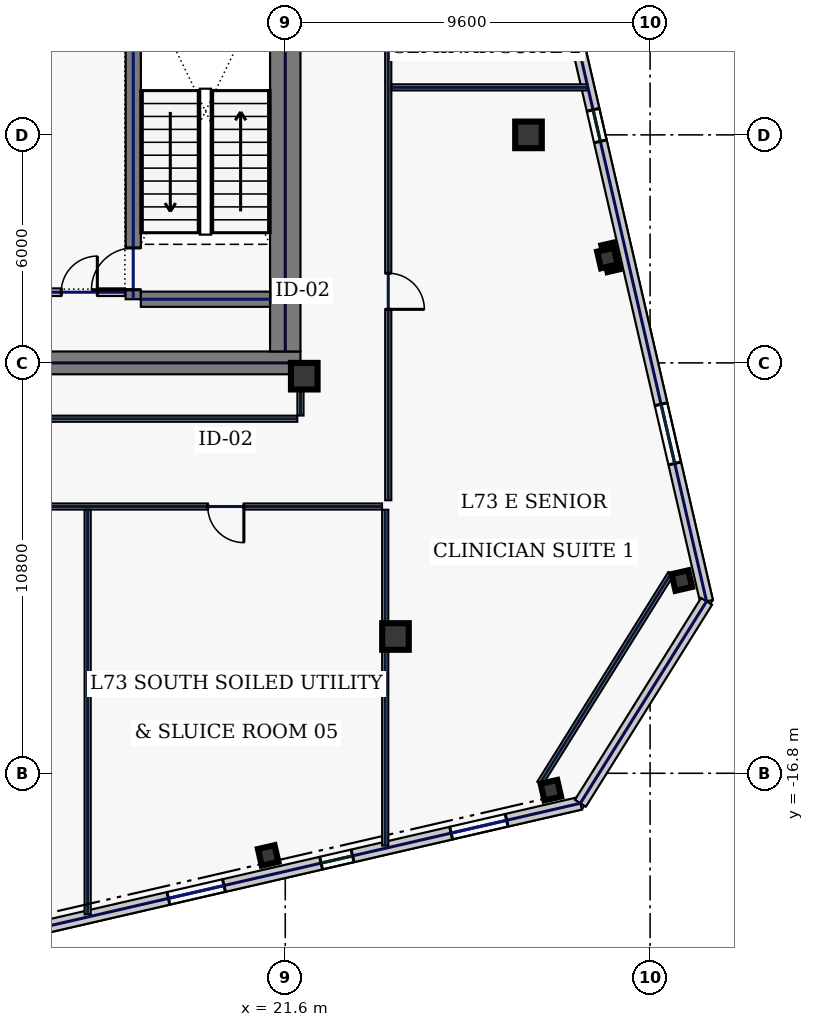
"""IFC4 building model, lengths in metres.
Left out: names, types, materials, properties, quantities, classifications, styles, units other than length and angle.
Written with IfcOpenShell. Run it as: python <this file> out.ifc"""

import sys

from ifc_helpers import new_model, si_unit, direction, frame, frame_2d, origin, origin_2d, place, context, subcontext, project, spatial, rectangle, hollow_rectangle, extrude, element, fill, save


model = new_model("IFC4")
c1 = context("Model", 3, precision=1e-05, world=origin(), true_north=direction((0.0, 1.0)))
c2 = subcontext(c1, "Body", "Model", "MODEL_VIEW")
j1 = project(units=[si_unit("LENGTHUNIT", "METRE"), si_unit("PLANEANGLEUNIT", "RADIAN")], contexts=[c1])
p1 = place(None, origin())
s1 = spatial("IfcSite", under=j1, at=p1, CompositionType="ELEMENT")
p2 = place(p1, origin())
s2 = spatial("IfcBuilding", under=s1, at=p2, CompositionType="ELEMENT")
p3 = place(p2, frame((0.0, 0.0, 313.0)))
s3 = spatial("IfcBuildingStorey", under=s2, at=p3, CompositionType="ELEMENT", Elevation=313.0)
p4 = place(p3, frame((10.5, -6.0, 0.0), z_axis=(0.0, 0.0, 1.0), x_axis=(1.0, 0.0, 0.0)))
e1 = element("IfcWall", 1, at=p4, inside=s3, PredefinedType="SHEAR", context=c2, shape_type="SweptSolid", body=[
    extrude(rectangle(XDim=11.5, YDim=0.6, at=frame_2d((5.75, 0.0))), origin(), (0.0, 0.0, 1.0), 3.74),
])
p5 = place(p3, frame((21.6, -5.7, 0.0), z_axis=(0.0, 0.0, 1.0), x_axis=(0.0, 1.0, 0.0)))
e2 = element("IfcWall", 2, at=p5, inside=s3, PredefinedType="SHEAR", context=c2, shape_type="SweptSolid", body=[
    extrude(rectangle(XDim=11.4, YDim=0.8, at=frame_2d((5.7, 0.0))), origin(), (0.0, 0.0, 1.0), 3.74),
])
p6 = place(p3, frame((17.6, -4.325, 0.0), z_axis=(0.0, 0.0, 1.0), x_axis=(0.0, 1.0, 0.0)))
e3 = element("IfcWall", 3, at=p6, inside=s3, PredefinedType="SHEAR", context=c2, shape_type="SweptSolid", body=[
    extrude(rectangle(XDim=8.65, YDim=0.4, at=frame_2d((4.325, 0.0))), origin(), (0.0, 0.0, 1.0), 3.74),
])
p7 = place(p6, frame((0.25, 0.0, 0.0)))
e4 = element("IfcOpeningElement", 4, at=p7, cuts=e3, PredefinedType="OPENING", context=c2, shape_type="SweptSolid", body=[
    extrude(rectangle(XDim=1.1, YDim=2.2, at=frame_2d((0.55, 1.1))), frame((0.0, 0.21, 0.0), z_axis=(0.0, -1.0, 0.0), x_axis=(1.0, 0.0, 0.0)), (0.0, 0.0, 1.0), 0.42),
])
p8 = place(p3, frame((17.8, -4.325, 0.0), z_axis=(0.0, 0.0, 1.0), x_axis=(1.0, 0.0, 0.0)))
e5 = element("IfcWall", 5, at=p8, inside=s3, PredefinedType="SHEAR", context=c2, shape_type="SweptSolid", body=[
    extrude(rectangle(XDim=3.4, YDim=0.4, at=frame_2d((1.7, 0.0))), origin(), (0.0, 0.0, 1.0), 3.74),
])
for number, where, z_axis, x_axis in (
    (6, (22.1, -6.35, 0.0), (0.0, 0.0, 1.0), (1.0, 0.0, 0.0)),
    (7, (24.5, -13.2, 0.0), (0.0, 0.0, 1.0), (1.0, 0.0, 0.0)),
    (8, (28.0, 0.0, 0.0), (0.0, 0.0, 1.0), (1.0, 0.0, 0.0)),
):
    element("IfcColumn", number, at=place(p3, frame(where, z_axis=z_axis, x_axis=x_axis)), inside=s3, PredefinedType="COLUMN", context=c2, shape_type="SweptSolid", body=[
        extrude(hollow_rectangle(XDim=0.7, YDim=0.7, WallThickness=0.032, at=origin_2d()), origin(), (0.0, 0.0, 1.0), 3.74),
    ])
for number, where, z_axis, x_axis in (
    (9, (21.15, -18.962, 0.0), (0.0, 0.0, 1.0), (0.974, 0.225, 0.0)),
    (10, (28.589, -17.245, 0.0), (0.0, 0.0, 1.0), (0.974, 0.225, 0.0)),
    (11, (32.036, -11.728, 0.0), (0.0, 0.0, 1.0), (0.974, 0.225, 0.0)),
    (12, (30.077, -3.241, 0.0), (0.0, 0.0, 1.0), (0.974, 0.225, 0.0)),
):
    element("IfcColumn", number, at=place(p3, frame(where, z_axis=z_axis, x_axis=x_axis)), inside=s3, PredefinedType="COLUMN", context=c2, shape_type="SweptSolid", body=[
        extrude(hollow_rectangle(XDim=0.45, YDim=0.45, WallThickness=0.022, at=origin_2d()), origin(), (0.0, 0.0, 1.0), 3.74),
    ])
p9 = place(p3, frame((12.445, -21.495, 0.0), z_axis=(0.0, 0.0, 1.0), x_axis=(0.974369392164, 0.224953967767, 0.0)))
e13 = element("IfcWall", 13, at=p9, inside=s3, PredefinedType="STANDARD", context=c2, shape_type="SweptSolid", body=[
    extrude(rectangle(XDim=17.366, YDim=0.34, at=frame_2d((8.683, 0.0))), origin(), (0.0, 0.0, 1.0), 3.74),
])
p10 = place(p9, frame((6.24, 0.0, 0.9)))
e14 = element("IfcOpeningElement", 14, at=p10, cuts=e13, PredefinedType="OPENING", context=c2, shape_type="SweptSolid", body=[
    extrude(rectangle(XDim=1.5, YDim=2.0, at=frame_2d((0.75, 1.0))), frame((0.0, 0.18, 0.0), z_axis=(0.0, -1.0, 0.0), x_axis=(1.0, 0.0, 0.0)), (0.0, 0.0, 1.0), 0.36),
])
p11 = place(p9, frame((10.363, 0.0, 0.9)))
e15 = element("IfcOpeningElement", 15, at=p11, cuts=e13, PredefinedType="OPENING", context=c2, shape_type="SweptSolid", body=[
    extrude(rectangle(XDim=0.85, YDim=1.85, at=frame_2d((0.425, 0.925))), frame((0.0, 0.18, 0.0), z_axis=(0.0, -1.0, 0.0), x_axis=(1.0, 0.0, 0.0)), (0.0, 0.0, 1.0), 0.36),
])
p12 = place(p9, frame((13.875, 0.0, 0.9)))
e16 = element("IfcOpeningElement", 16, at=p12, cuts=e13, PredefinedType="OPENING", context=c2, shape_type="SweptSolid", body=[
    extrude(rectangle(XDim=1.5, YDim=2.0, at=frame_2d((0.75, 1.0))), frame((0.0, 0.18, 0.0), z_axis=(0.0, -1.0, 0.0), x_axis=(1.0, 0.0, 0.0)), (0.0, 0.0, 1.0), 0.36),
])
p13 = place(p3, frame((32.686, -12.276, 0.0), z_axis=(0.0, 0.0, 1.0), x_axis=(-0.224953091034, 0.974369594576, 0.0)))
e17 = element("IfcWall", 17, at=p13, inside=s3, PredefinedType="STANDARD", context=c2, shape_type="SweptSolid", body=[
    extrude(rectangle(XDim=36.2, YDim=0.34, at=frame_2d((18.1, 0.0))), origin(), (0.0, 0.0, 1.0), 3.74),
])
p14 = place(p13, frame((3.725, 0.0, 0.58)))
e18 = element("IfcOpeningElement", 18, at=p14, cuts=e17, PredefinedType="OPENING", context=c2, shape_type="SweptSolid", body=[
    extrude(rectangle(XDim=1.6, YDim=2.3, at=frame_2d((0.8, 1.15))), frame((0.0, 0.18, 0.0), z_axis=(0.0, -1.0, 0.0), x_axis=(1.0, 0.0, 0.0)), (0.0, 0.0, 1.0), 0.36),
])
p15 = place(p13, frame((12.425, 0.0, 0.75)))
e19 = element("IfcOpeningElement", 19, at=p15, cuts=e17, PredefinedType="OPENING", context=c2, shape_type="SweptSolid", body=[
    extrude(rectangle(XDim=0.85, YDim=1.85, at=frame_2d((0.425, 0.925))), frame((0.0, 0.18, 0.0), z_axis=(0.0, -1.0, 0.0), x_axis=(1.0, 0.0, 0.0)), (0.0, 0.0, 1.0), 0.36),
])
p16 = place(p13, frame((21.825, 0.0, 0.58)))
e20 = element("IfcOpeningElement", 20, at=p16, cuts=e17, PredefinedType="OPENING", context=c2, shape_type="SweptSolid", body=[
    extrude(rectangle(XDim=1.6, YDim=2.3, at=frame_2d((0.8, 1.15))), frame((0.0, 0.18, 0.0), z_axis=(0.0, -1.0, 0.0), x_axis=(1.0, 0.0, 0.0)), (0.0, 0.0, 1.0), 0.36),
])
p17 = place(p13, frame((30.875, 0.0, 0.58)))
e21 = element("IfcOpeningElement", 21, at=p17, cuts=e17, PredefinedType="OPENING", context=c2, shape_type="SweptSolid", body=[
    extrude(rectangle(XDim=1.6, YDim=2.3, at=frame_2d((0.8, 1.15))), frame((0.0, 0.18, 0.0), z_axis=(0.0, -1.0, 0.0), x_axis=(1.0, 0.0, 0.0)), (0.0, 0.0, 1.0), 0.36),
])
p18 = place(p3, frame((29.366, -17.589, 0.0), z_axis=(0.0, 0.0, 1.0), x_axis=(0.529907862057, 0.848055220921, 0.0)))
e22 = element("IfcWall", 22, at=p18, inside=s3, PredefinedType="STANDARD", context=c2, shape_type="SweptSolid", body=[
    extrude(rectangle(XDim=6.265, YDim=0.34, at=frame_2d((3.132, 0.0))), origin(), (0.0, 0.0, 1.0), 3.74),
])
p19 = place(p3, frame((14.825, -4.14, 0.0), z_axis=(0.0, 0.0, 1.0), x_axis=(1.0, 0.0, 0.0)))
e23 = element("IfcWall", 23, at=p19, inside=s3, PredefinedType="SOLIDWALL", context=c2, shape_type="SweptSolid", body=[
    extrude(rectangle(XDim=2.555, YDim=0.2, at=frame_2d((1.277, 0.0))), origin(), (0.0, 0.0, 1.0), 3.74),
])
p20 = place(p19, frame((0.88, 0.0, 0.0)))
e24 = element("IfcOpeningElement", 24, at=p20, cuts=e23, PredefinedType="OPENING", context=c2, shape_type="SweptSolid", body=[
    extrude(rectangle(XDim=0.95, YDim=2.2, at=frame_2d((0.475, 1.1))), frame((0.0, 0.11, 0.0), z_axis=(0.0, -1.0, 0.0), x_axis=(1.0, 0.0, 0.0)), (0.0, 0.0, 1.0), 0.22),
])
p21 = place(p3, frame((28.3, -17.065, 0.0), z_axis=(0.0, 0.0, 1.0), x_axis=(0.529914601736, 0.848051009591, 0.0)))
e25 = element("IfcWall", 25, at=p21, inside=s3, PredefinedType="PARTITIONING", context=c2, shape_type="SweptSolid", body=[
    extrude(rectangle(XDim=6.505, YDim=0.16, at=frame_2d((3.253, 0.0))), origin(), (0.0, 0.0, 1.0), 3.74),
])
p22 = place(p3, frame((24.31, 9.665, 0.0), z_axis=(0.0, 0.0, 1.0), x_axis=(0.0, -1.0, 0.0)))
e26 = element("IfcWall", 26, at=p22, inside=s3, PredefinedType="PARTITIONING", context=c2, shape_type="SweptSolid", body=[
    extrude(rectangle(XDim=19.28, YDim=0.16, at=frame_2d((9.64, 0.0))), origin(), (0.0, 0.0, 1.0), 3.74),
])
p23 = place(p22, frame((13.306, 0.0, 0.0)))
e27 = element("IfcOpeningElement", 27, at=p23, cuts=e26, PredefinedType="OPENING", context=c2, shape_type="SweptSolid", body=[
    extrude(rectangle(XDim=0.95, YDim=2.2, at=frame_2d((0.475, 1.1))), frame((0.0, 0.09, 0.0), z_axis=(0.0, -1.0, 0.0), x_axis=(1.0, 0.0, 0.0)), (0.0, 0.0, 1.0), 0.18),
])
p24 = place(p22, frame((3.969, 0.0, 0.0)))
e28 = element("IfcOpeningElement", 28, at=p24, cuts=e26, PredefinedType="OPENING", context=c2, shape_type="SweptSolid", body=[
    extrude(rectangle(XDim=0.95, YDim=2.2, at=frame_2d((0.475, 1.1))), frame((0.0, 0.09, 0.0), z_axis=(0.0, -1.0, 0.0), x_axis=(1.0, 0.0, 0.0)), (0.0, 0.0, 1.0), 0.18),
])
p25 = place(p3, frame((24.145, -9.78, 0.0), z_axis=(0.0, 0.0, 1.0), x_axis=(-1.0, 0.0, 0.0)))
e29 = element("IfcWall", 29, at=p25, inside=s3, PredefinedType="PARTITIONING", context=c2, shape_type="SweptSolid", body=[
    extrude(rectangle(XDim=36.68, YDim=0.16, at=frame_2d((18.34, 0.0))), origin(), (0.0, 0.0, 1.0), 3.74),
])
p26 = place(p25, frame((30.105, 0.0, 0.0)))
e30 = element("IfcOpeningElement", 30, at=p26, cuts=e29, PredefinedType="OPENING", context=c2, shape_type="SweptSolid", body=[
    extrude(rectangle(XDim=1.3, YDim=2.2, at=frame_2d((0.65, 1.1))), frame((0.0, 0.09, 0.0), z_axis=(0.0, -1.0, 0.0), x_axis=(1.0, 0.0, 0.0)), (0.0, 0.0, 1.0), 0.18),
])
p27 = place(p25, frame((23.205, 0.0, 0.0)))
e31 = element("IfcOpeningElement", 31, at=p27, cuts=e29, PredefinedType="OPENING", context=c2, shape_type="SweptSolid", body=[
    extrude(rectangle(XDim=1.3, YDim=2.2, at=frame_2d((0.65, 1.1))), frame((0.0, 0.09, 0.0), z_axis=(0.0, -1.0, 0.0), x_axis=(1.0, 0.0, 0.0)), (0.0, 0.0, 1.0), 0.18),
])
p28 = place(p25, frame((16.555, 0.0, 0.0)))
e32 = element("IfcOpeningElement", 32, at=p28, cuts=e29, PredefinedType="OPENING", context=c2, shape_type="SweptSolid", body=[
    extrude(rectangle(XDim=1.3, YDim=2.2, at=frame_2d((0.65, 1.1))), frame((0.0, 0.09, 0.0), z_axis=(0.0, -1.0, 0.0), x_axis=(1.0, 0.0, 0.0)), (0.0, 0.0, 1.0), 0.18),
])
p29 = place(p25, frame((10.33, 0.0, 0.0)))
e33 = element("IfcOpeningElement", 33, at=p29, cuts=e29, PredefinedType="OPENING", context=c2, shape_type="SweptSolid", body=[
    extrude(rectangle(XDim=0.95, YDim=2.2, at=frame_2d((0.475, 1.1))), frame((0.0, 0.09, 0.0), z_axis=(0.0, -1.0, 0.0), x_axis=(1.0, 0.0, 0.0)), (0.0, 0.0, 1.0), 0.18),
])
p30 = place(p25, frame((3.634, 0.0, 0.0)))
e34 = element("IfcOpeningElement", 34, at=p30, cuts=e29, PredefinedType="OPENING", context=c2, shape_type="SweptSolid", body=[
    extrude(rectangle(XDim=0.95, YDim=2.2, at=frame_2d((0.475, 1.1))), frame((0.0, 0.09, 0.0), z_axis=(0.0, -1.0, 0.0), x_axis=(1.0, 0.0, 0.0)), (0.0, 0.0, 1.0), 0.18),
])
p31 = place(p3, frame((10.715, -7.47, 0.0), z_axis=(0.0, 0.0, 1.0), x_axis=(1.0, 0.0, 0.0)))
e35 = element("IfcWall", 35, at=p31, inside=s3, PredefinedType="PARTITIONING", context=c2, shape_type="SweptSolid", body=[
    extrude(rectangle(XDim=11.2, YDim=0.16, at=frame_2d((5.6, 0.0))), origin(), (0.0, 0.0, 1.0), 3.74),
])
p32 = place(p3, frame((22.0, -7.385, 0.0), z_axis=(0.0, 0.0, 1.0), x_axis=(0.0, 1.0, 0.0)))
e36 = element("IfcWall", 36, at=p32, inside=s3, PredefinedType="PARTITIONING", context=c2, shape_type="SweptSolid", body=[
    extrude(rectangle(XDim=0.965, YDim=0.16, at=frame_2d((0.482, 0.0))), origin(), (0.0, 0.0, 1.0), 3.74),
])
p33 = place(p3, frame((24.23, -18.703, 0.0), z_axis=(0.0, 0.0, 1.0), x_axis=(0.0, 1.0, 0.0)))
e37 = element("IfcWall", 37, at=p33, inside=s3, PredefinedType="PARTITIONING", context=c2, shape_type="SweptSolid", body=[
    extrude(rectangle(XDim=8.838, YDim=0.16, at=frame_2d((4.419, 0.0))), origin(), (0.0, 0.0, 1.0), 3.74),
])
p34 = place(p3, frame((16.4, -20.51, 0.0), z_axis=(0.0, 0.0, 1.0), x_axis=(0.0, 1.0, 0.0)))
e38 = element("IfcWall", 38, at=p34, inside=s3, PredefinedType="PARTITIONING", context=c2, shape_type="SweptSolid", body=[
    extrude(rectangle(XDim=10.646, YDim=0.16, at=frame_2d((5.323, 0.0))), origin(), (0.0, 0.0, 1.0), 3.74),
])
p35 = place(p3, frame((24.395, 1.25, 0.0), z_axis=(0.0, 0.0, 1.0), x_axis=(1.0, 0.0, 0.0)))
e39 = element("IfcWall", 39, at=p35, inside=s3, PredefinedType="PARTITIONING", context=c2, shape_type="SweptSolid", body=[
    extrude(rectangle(XDim=5.147, YDim=0.16, at=frame_2d((2.574, 0.0))), origin(), (0.0, 0.0, 1.0), 3.74),
])
p36 = place(p10, origin())
e40 = element("IfcWindow", 40, at=p36, inside=s3, PartitioningType="SINGLE_PANEL", PredefinedType="WINDOW", context=c2, shape_type="SweptSolid", body=[
    extrude(rectangle(XDim=1.5, YDim=2.0, at=frame_2d((0.75, 1.0))), frame((0.0, 0.03, 0.0), z_axis=(0.0, -1.0, 0.0), x_axis=(1.0, 0.0, 0.0)), (0.0, 0.0, 1.0), 0.06),
])
fill(e14, e40)
p37 = place(p11, origin())
e41 = element("IfcWindow", 41, at=p37, inside=s3, PartitioningType="SINGLE_PANEL", PredefinedType="WINDOW", context=c2, shape_type="SweptSolid", body=[
    extrude(rectangle(XDim=0.85, YDim=1.85, at=frame_2d((0.425, 0.925))), frame((0.0, 0.03, 0.0), z_axis=(0.0, -1.0, 0.0), x_axis=(1.0, 0.0, 0.0)), (0.0, 0.0, 1.0), 0.06),
])
fill(e15, e41)
p38 = place(p12, origin())
e42 = element("IfcWindow", 42, at=p38, inside=s3, PartitioningType="SINGLE_PANEL", PredefinedType="WINDOW", context=c2, shape_type="SweptSolid", body=[
    extrude(rectangle(XDim=1.5, YDim=2.0, at=frame_2d((0.75, 1.0))), frame((0.0, 0.03, 0.0), z_axis=(0.0, -1.0, 0.0), x_axis=(1.0, 0.0, 0.0)), (0.0, 0.0, 1.0), 0.06),
])
fill(e16, e42)
p39 = place(p14, origin())
e43 = element("IfcWindow", 43, at=p39, inside=s3, PartitioningType="SINGLE_PANEL", PredefinedType="WINDOW", context=c2, shape_type="SweptSolid", body=[
    extrude(rectangle(XDim=1.6, YDim=2.3, at=frame_2d((0.8, 1.15))), frame((0.0, 0.03, 0.0), z_axis=(0.0, -1.0, 0.0), x_axis=(1.0, 0.0, 0.0)), (0.0, 0.0, 1.0), 0.06),
])
fill(e18, e43)
p40 = place(p15, origin())
e44 = element("IfcWindow", 44, at=p40, inside=s3, PartitioningType="SINGLE_PANEL", PredefinedType="WINDOW", context=c2, shape_type="SweptSolid", body=[
    extrude(rectangle(XDim=0.85, YDim=1.85, at=frame_2d((0.425, 0.925))), frame((0.0, 0.03, 0.0), z_axis=(0.0, -1.0, 0.0), x_axis=(1.0, 0.0, 0.0)), (0.0, 0.0, 1.0), 0.06),
])
fill(e19, e44)
p41 = place(p7, origin())
e45 = element("IfcDoor", 45, at=p41, inside=s3, OperationType="SINGLE_SWING_LEFT", PredefinedType="DOOR", context=c2, shape_type="SweptSolid", body=[
    extrude(rectangle(XDim=1.1, YDim=2.2, at=frame_2d((0.55, 1.1))), frame((0.0, 0.025, 0.0), z_axis=(0.0, -1.0, 0.0), x_axis=(1.0, 0.0, 0.0)), (0.0, 0.0, 1.0), 0.05),
])
fill(e4, e45)
p42 = place(p20, origin())
e46 = element("IfcDoor", 46, at=p42, inside=s3, OperationType="SINGLE_SWING_RIGHT", PredefinedType="DOOR", context=c2, shape_type="SweptSolid", body=[
    extrude(rectangle(XDim=0.95, YDim=2.2, at=frame_2d((0.475, 1.1))), frame((0.0, 0.025, 0.0), z_axis=(0.0, -1.0, 0.0), x_axis=(1.0, 0.0, 0.0)), (0.0, 0.0, 1.0), 0.05),
])
fill(e24, e46)
p43 = place(p30, origin())
e47 = element("IfcDoor", 47, at=p43, inside=s3, OperationType="SINGLE_SWING_LEFT", PredefinedType="DOOR", context=c2, shape_type="SweptSolid", body=[
    extrude(rectangle(XDim=0.95, YDim=2.2, at=frame_2d((0.475, 1.1))), frame((0.0, 0.025, 0.0), z_axis=(0.0, -1.0, 0.0), x_axis=(1.0, 0.0, 0.0)), (0.0, 0.0, 1.0), 0.05),
])
fill(e34, e47)
p44 = place(p23, origin())
e48 = element("IfcDoor", 48, at=p44, inside=s3, OperationType="SINGLE_SWING_RIGHT", PredefinedType="DOOR", context=c2, shape_type="SweptSolid", body=[
    extrude(rectangle(XDim=0.95, YDim=2.2, at=frame_2d((0.475, 1.1))), frame((0.0, 0.025, 0.0), z_axis=(0.0, -1.0, 0.0), x_axis=(1.0, 0.0, 0.0)), (0.0, 0.0, 1.0), 0.05),
])
fill(e27, e48)
save(model, sys.argv[1])
